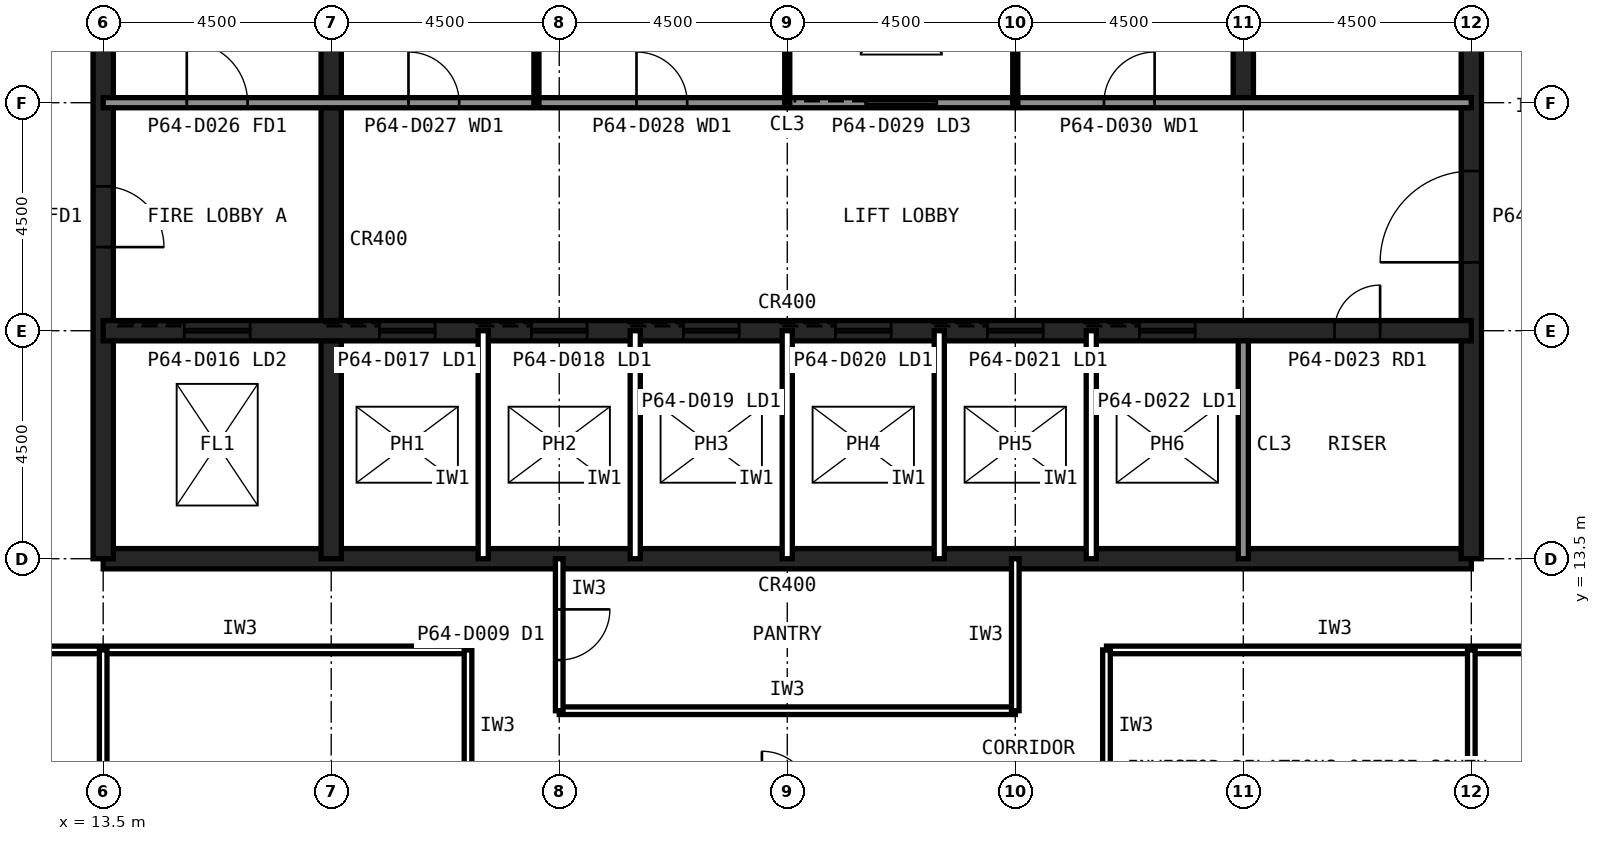
"""IFC4 building model, lengths in metres.
Left out: names, types, materials, properties, quantities, classifications, styles, units other than length and angle.
Written with IfcOpenShell. Run it as: python <this file> out.ifc"""

import sys

from ifc_helpers import new_model, si_unit, direction, frame, frame_2d, origin, place, context, subcontext, project, spatial, rectangle, extrude, element, fill, save


model = new_model("IFC4")
c1 = context("Model", 3, precision=1e-05, world=origin(), true_north=direction((0.0, 1.0)))
c2 = subcontext(c1, "Body", "Model", "MODEL_VIEW")
j1 = project(units=[si_unit("LENGTHUNIT", "METRE"), si_unit("PLANEANGLEUNIT", "RADIAN")], contexts=[c1])
p1 = place(None, origin())
s1 = spatial("IfcSite", under=j1, at=p1, CompositionType="ELEMENT")
p2 = place(p1, origin())
s2 = spatial("IfcBuilding", under=s1, at=p2, CompositionType="ELEMENT")
p3 = place(p2, frame((0.0, 0.0, 270.6)))
s3 = spatial("IfcBuildingStorey", under=s2, at=p3, CompositionType="ELEMENT", Elevation=270.6)
p4 = place(p3, frame((13.5, 13.5, 0.0), z_axis=(0.0, 0.0, 1.0), x_axis=(1.0, 0.0, 0.0)))
e1 = element("IfcWall", 1, at=p4, inside=s3, PredefinedType="SHEAR", context=c2, shape_type="SweptSolid", body=[
    extrude(rectangle(XDim=27.0, YDim=0.4, at=frame_2d((13.5, 0.0))), origin(), (0.0, 0.0, 1.0), 4.0),
])
p5 = place(p3, frame((40.5, 13.5, 0.0), z_axis=(0.0, 0.0, 1.0), x_axis=(0.0, 1.0, 0.0)))
e2 = element("IfcWall", 2, at=p5, inside=s3, PredefinedType="SHEAR", context=c2, shape_type="SweptSolid", body=[
    extrude(rectangle(XDim=27.0, YDim=0.4, at=frame_2d((13.5, 0.0))), origin(), (0.0, 0.0, 1.0), 4.0),
])
p6 = place(p5, frame((5.85, 0.0, 0.0)))
e3 = element("IfcOpeningElement", 3, at=p6, cuts=e2, PredefinedType="OPENING", context=c2, shape_type="SweptSolid", body=[
    extrude(rectangle(XDim=1.8, YDim=2.1, at=frame_2d((0.9, 1.05))), frame((0.0, 0.21, 0.0), z_axis=(0.0, -1.0, 0.0), x_axis=(1.0, 0.0, 0.0)), (0.0, 0.0, 1.0), 0.42),
])
p7 = place(p5, frame((19.65, 0.0, 0.0)))
e4 = element("IfcOpeningElement", 4, at=p7, cuts=e2, PredefinedType="OPENING", context=c2, shape_type="SweptSolid", body=[
    extrude(rectangle(XDim=1.2, YDim=2.1, at=frame_2d((0.6, 1.05))), frame((0.0, 0.21, 0.0), z_axis=(0.0, -1.0, 0.0), x_axis=(1.0, 0.0, 0.0)), (0.0, 0.0, 1.0), 0.42),
])
p8 = place(p3, frame((13.5, 40.5, 0.0), z_axis=(0.0, 0.0, 1.0), x_axis=(0.0, -1.0, 0.0)))
e5 = element("IfcWall", 5, at=p8, inside=s3, PredefinedType="SHEAR", context=c2, shape_type="SweptSolid", body=[
    extrude(rectangle(XDim=27.0, YDim=0.4, at=frame_2d((13.5, 0.0))), origin(), (0.0, 0.0, 1.0), 4.0),
])
p9 = place(p8, frame((19.65, 0.0, 0.0)))
e6 = element("IfcOpeningElement", 6, at=p9, cuts=e5, PredefinedType="OPENING", context=c2, shape_type="SweptSolid", body=[
    extrude(rectangle(XDim=1.2, YDim=2.1, at=frame_2d((0.6, 1.05))), frame((0.0, 0.21, 0.0), z_axis=(0.0, -1.0, 0.0), x_axis=(1.0, 0.0, 0.0)), (0.0, 0.0, 1.0), 0.42),
])
p10 = place(p8, frame((5.85, 0.0, 0.0)))
e7 = element("IfcOpeningElement", 7, at=p10, cuts=e5, PredefinedType="OPENING", context=c2, shape_type="SweptSolid", body=[
    extrude(rectangle(XDim=1.8, YDim=2.1, at=frame_2d((0.9, 1.05))), frame((0.0, 0.21, 0.0), z_axis=(0.0, -1.0, 0.0), x_axis=(1.0, 0.0, 0.0)), (0.0, 0.0, 1.0), 0.42),
])
p11 = place(p3, frame((18.0, 13.5, 0.0), z_axis=(0.0, 0.0, 1.0), x_axis=(0.0, 1.0, 0.0)))
e8 = element("IfcWall", 8, at=p11, inside=s3, PredefinedType="SHEAR", context=c2, shape_type="SweptSolid", body=[
    extrude(rectangle(XDim=18.0, YDim=0.4, at=frame_2d((9.0, 0.0))), origin(), (0.0, 0.0, 1.0), 4.0),
])
p12 = place(p3, frame((36.0, 13.5, 0.0), z_axis=(0.0, 0.0, 1.0), x_axis=(0.0, 1.0, 0.0)))
e9 = element("IfcWall", 9, at=p12, inside=s3, PredefinedType="SOLIDWALL", context=c2, shape_type="SweptSolid", body=[
    extrude(rectangle(XDim=4.5, YDim=0.2, at=frame_2d((2.25, 0.0))), origin(), (0.0, 0.0, 1.0), 3.84),
])
p13 = place(p3, frame((36.0, 22.5, 0.0), z_axis=(0.0, 0.0, 1.0), x_axis=(0.0, 1.0, 0.0)))
e10 = element("IfcWall", 10, at=p13, inside=s3, PredefinedType="SHEAR", context=c2, shape_type="SweptSolid", body=[
    extrude(rectangle(XDim=18.0, YDim=0.4, at=frame_2d((9.0, 0.0))), origin(), (0.0, 0.0, 1.0), 4.0),
])
p14 = place(p3, frame((13.5, 18.0, 0.0), z_axis=(0.0, 0.0, 1.0), x_axis=(1.0, 0.0, 0.0)))
e11 = element("IfcWall", 11, at=p14, inside=s3, PredefinedType="SHEAR", context=c2, shape_type="SweptSolid", body=[
    extrude(rectangle(XDim=27.0, YDim=0.4, at=frame_2d((13.5, 0.0))), origin(), (0.0, 0.0, 1.0), 4.0),
])
p15 = place(p14, frame((24.3, 0.0, 0.0)))
e12 = element("IfcOpeningElement", 12, at=p15, cuts=e11, PredefinedType="OPENING", context=c2, shape_type="SweptSolid", body=[
    extrude(rectangle(XDim=0.9, YDim=2.1, at=frame_2d((0.45, 1.05))), frame((0.0, 0.21, 0.0), z_axis=(0.0, -1.0, 0.0), x_axis=(1.0, 0.0, 0.0)), (0.0, 0.0, 1.0), 0.42),
])
p16 = place(p14, frame((5.45, 0.0, 0.0)))
e13 = element("IfcOpeningElement", 13, at=p16, cuts=e11, PredefinedType="OPENING", context=c2, shape_type="SweptSolid", body=[
    extrude(rectangle(XDim=1.1, YDim=2.1, at=frame_2d((0.55, 1.05))), frame((0.0, 0.21, 0.0), z_axis=(0.0, -1.0, 0.0), x_axis=(1.0, 0.0, 0.0)), (0.0, 0.0, 1.0), 0.42),
])
p17 = place(p14, frame((8.45, 0.0, 0.0)))
e14 = element("IfcOpeningElement", 14, at=p17, cuts=e11, PredefinedType="OPENING", context=c2, shape_type="SweptSolid", body=[
    extrude(rectangle(XDim=1.1, YDim=2.1, at=frame_2d((0.55, 1.05))), frame((0.0, 0.21, 0.0), z_axis=(0.0, -1.0, 0.0), x_axis=(1.0, 0.0, 0.0)), (0.0, 0.0, 1.0), 0.42),
])
p18 = place(p14, frame((11.45, 0.0, 0.0)))
e15 = element("IfcOpeningElement", 15, at=p18, cuts=e11, PredefinedType="OPENING", context=c2, shape_type="SweptSolid", body=[
    extrude(rectangle(XDim=1.1, YDim=2.1, at=frame_2d((0.55, 1.05))), frame((0.0, 0.21, 0.0), z_axis=(0.0, -1.0, 0.0), x_axis=(1.0, 0.0, 0.0)), (0.0, 0.0, 1.0), 0.42),
])
p19 = place(p14, frame((14.45, 0.0, 0.0)))
e16 = element("IfcOpeningElement", 16, at=p19, cuts=e11, PredefinedType="OPENING", context=c2, shape_type="SweptSolid", body=[
    extrude(rectangle(XDim=1.1, YDim=2.1, at=frame_2d((0.55, 1.05))), frame((0.0, 0.21, 0.0), z_axis=(0.0, -1.0, 0.0), x_axis=(1.0, 0.0, 0.0)), (0.0, 0.0, 1.0), 0.42),
])
p20 = place(p14, frame((17.45, 0.0, 0.0)))
e17 = element("IfcOpeningElement", 17, at=p20, cuts=e11, PredefinedType="OPENING", context=c2, shape_type="SweptSolid", body=[
    extrude(rectangle(XDim=1.1, YDim=2.1, at=frame_2d((0.55, 1.05))), frame((0.0, 0.21, 0.0), z_axis=(0.0, -1.0, 0.0), x_axis=(1.0, 0.0, 0.0)), (0.0, 0.0, 1.0), 0.42),
])
p21 = place(p14, frame((20.45, 0.0, 0.0)))
e18 = element("IfcOpeningElement", 18, at=p21, cuts=e11, PredefinedType="OPENING", context=c2, shape_type="SweptSolid", body=[
    extrude(rectangle(XDim=1.1, YDim=2.1, at=frame_2d((0.55, 1.05))), frame((0.0, 0.21, 0.0), z_axis=(0.0, -1.0, 0.0), x_axis=(1.0, 0.0, 0.0)), (0.0, 0.0, 1.0), 0.42),
])
p22 = place(p14, frame((1.6, 0.0, 0.0)))
e19 = element("IfcOpeningElement", 19, at=p22, cuts=e11, PredefinedType="OPENING", context=c2, shape_type="SweptSolid", body=[
    extrude(rectangle(XDim=1.3, YDim=2.2, at=frame_2d((0.65, 1.1))), frame((0.0, 0.21, 0.0), z_axis=(0.0, -1.0, 0.0), x_axis=(1.0, 0.0, 0.0)), (0.0, 0.0, 1.0), 0.42),
])
p23 = place(p3, frame((13.5, 22.5, 0.0), z_axis=(0.0, 0.0, 1.0), x_axis=(1.0, 0.0, 0.0)))
e20 = element("IfcWall", 20, at=p23, inside=s3, PredefinedType="SOLIDWALL", context=c2, shape_type="SweptSolid", body=[
    extrude(rectangle(XDim=27.0, YDim=0.2, at=frame_2d((13.5, 0.0))), origin(), (0.0, 0.0, 1.0), 3.84),
])
p24 = place(p23, frame((1.65, 0.0, 0.0)))
e21 = element("IfcOpeningElement", 21, at=p24, cuts=e20, PredefinedType="OPENING", context=c2, shape_type="SweptSolid", body=[
    extrude(rectangle(XDim=1.2, YDim=2.1, at=frame_2d((0.6, 1.05))), frame((0.0, 0.11, 0.0), z_axis=(0.0, -1.0, 0.0), x_axis=(1.0, 0.0, 0.0)), (0.0, 0.0, 1.0), 0.22),
])
p25 = place(p23, frame((6.025, 0.0, 0.0)))
e22 = element("IfcOpeningElement", 22, at=p25, cuts=e20, PredefinedType="OPENING", context=c2, shape_type="SweptSolid", body=[
    extrude(rectangle(XDim=1.0, YDim=2.1, at=frame_2d((0.5, 1.05))), frame((0.0, 0.11, 0.0), z_axis=(0.0, -1.0, 0.0), x_axis=(1.0, 0.0, 0.0)), (0.0, 0.0, 1.0), 0.22),
])
p26 = place(p23, frame((10.525, 0.0, 0.0)))
e23 = element("IfcOpeningElement", 23, at=p26, cuts=e20, PredefinedType="OPENING", context=c2, shape_type="SweptSolid", body=[
    extrude(rectangle(XDim=1.0, YDim=2.1, at=frame_2d((0.5, 1.05))), frame((0.0, 0.11, 0.0), z_axis=(0.0, -1.0, 0.0), x_axis=(1.0, 0.0, 0.0)), (0.0, 0.0, 1.0), 0.22),
])
p27 = place(p23, frame((19.75, 0.0, 0.0)))
e24 = element("IfcOpeningElement", 24, at=p27, cuts=e20, PredefinedType="OPENING", context=c2, shape_type="SweptSolid", body=[
    extrude(rectangle(XDim=1.0, YDim=2.1, at=frame_2d((0.5, 1.05))), frame((0.0, 0.11, 0.0), z_axis=(0.0, -1.0, 0.0), x_axis=(1.0, 0.0, 0.0)), (0.0, 0.0, 1.0), 0.22),
])
p28 = place(p23, frame((15.05, 0.0, 0.0)))
e25 = element("IfcOpeningElement", 25, at=p28, cuts=e20, PredefinedType="OPENING", context=c2, shape_type="SweptSolid", body=[
    extrude(rectangle(XDim=1.4, YDim=2.4, at=frame_2d((0.7, 1.2))), frame((0.0, 0.11, 0.0), z_axis=(0.0, -1.0, 0.0), x_axis=(1.0, 0.0, 0.0)), (0.0, 0.0, 1.0), 0.22),
])
for number, where, z_axis, x_axis in (
    (26, (21.0, 13.5, 0.0), (0.0, 0.0, 1.0), (0.0, 1.0, 0.0)),
    (27, (24.0, 13.5, 0.0), (0.0, 0.0, 1.0), (0.0, 1.0, 0.0)),
    (28, (27.0, 13.5, 0.0), (0.0, 0.0, 1.0), (0.0, 1.0, 0.0)),
    (29, (30.0, 13.5, 0.0), (0.0, 0.0, 1.0), (0.0, 1.0, 0.0)),
    (30, (33.0, 13.5, 0.0), (0.0, 0.0, 1.0), (0.0, 1.0, 0.0)),
):
    element("IfcWall", number, at=place(p3, frame(where, z_axis=z_axis, x_axis=x_axis)), inside=s3, PredefinedType="PARTITIONING", context=c2, shape_type="SweptSolid", body=[
        extrude(rectangle(XDim=4.5, YDim=0.2, at=frame_2d((2.25, 0.0))), origin(), (0.0, 0.0, 1.0), 3.84),
    ])
for number, where, z_axis, x_axis in (
    (31, (22.05, 22.5, 0.0), (0.0, 0.0, 1.0), (0.0, 1.0, 0.0)),
    (32, (27.0, 22.5, 0.0), (0.0, 0.0, 1.0), (0.0, 1.0, 0.0)),
    (33, (31.5, 22.5, 0.0), (0.0, 0.0, 1.0), (0.0, 1.0, 0.0)),
):
    element("IfcWall", number, at=place(p3, frame(where, z_axis=z_axis, x_axis=x_axis)), inside=s3, PredefinedType="PLUMBINGWALL", context=c2, shape_type="SweptSolid", body=[
        extrude(rectangle(XDim=9.0, YDim=0.1, at=frame_2d((4.5, 0.0))), origin(), (0.0, 0.0, 1.0), 3.84),
    ])
for number, where, z_axis, x_axis in (
    (34, (11.7, 11.7, 0.0), (0.0, 0.0, 1.0), (1.0, 0.0, 0.0)),
    (35, (33.3, 11.7, 0.0), (0.0, 0.0, 1.0), (1.0, 0.0, 0.0)),
):
    element("IfcWall", number, at=place(p3, frame(where, z_axis=z_axis, x_axis=x_axis)), inside=s3, PredefinedType="PARTITIONING", context=c2, shape_type="SweptSolid", body=[
        extrude(rectangle(XDim=9.0, YDim=0.15, at=frame_2d((4.5, 0.0))), origin(), (0.0, 0.0, 1.0), 3.84),
    ])
for number, where, z_axis, x_axis in (
    (36, (20.7, 11.7, 0.0), (0.0, 0.0, 1.0), (0.0, -1.0, 0.0)),
    (37, (33.3, 8.7, 0.0), (0.0, 0.0, 1.0), (0.0, 1.0, 0.0)),
):
    element("IfcWall", number, at=place(p3, frame(where, z_axis=z_axis, x_axis=x_axis)), inside=s3, PredefinedType="PARTITIONING", context=c2, shape_type="SweptSolid", body=[
        extrude(rectangle(XDim=3.0, YDim=0.15, at=frame_2d((1.5, 0.0))), origin(), (0.0, 0.0, 1.0), 3.84),
    ])
p29 = place(p3, frame((22.5, 10.5, 0.0), z_axis=(0.0, 0.0, 1.0), x_axis=(1.0, 0.0, 0.0)))
e38 = element("IfcWall", 38, at=p29, inside=s3, PredefinedType="PARTITIONING", context=c2, shape_type="SweptSolid", body=[
    extrude(rectangle(XDim=9.0, YDim=0.15, at=frame_2d((4.5, 0.0))), origin(), (0.0, 0.0, 1.0), 3.84),
])
p30 = place(p3, frame((31.5, 10.5, 0.0), z_axis=(0.0, 0.0, 1.0), x_axis=(0.0, 1.0, 0.0)))
e39 = element("IfcWall", 39, at=p30, inside=s3, PredefinedType="PARTITIONING", context=c2, shape_type="SweptSolid", body=[
    extrude(rectangle(XDim=3.0, YDim=0.15, at=frame_2d((1.5, 0.0))), origin(), (0.0, 0.0, 1.0), 2.989),
])
p31 = place(p3, frame((22.5, 13.5, 0.0), z_axis=(0.0, 0.0, 1.0), x_axis=(0.0, -1.0, 0.0)))
e40 = element("IfcWall", 40, at=p31, inside=s3, PredefinedType="PARTITIONING", context=c2, shape_type="SweptSolid", body=[
    extrude(rectangle(XDim=3.0, YDim=0.15, at=frame_2d((1.5, 0.0))), origin(), (0.0, 0.0, 1.0), 2.989),
])
p32 = place(p31, frame((1.0, 0.0, 0.0)))
e41 = element("IfcOpeningElement", 41, at=p32, cuts=e40, PredefinedType="OPENING", context=c2, shape_type="SweptSolid", body=[
    extrude(rectangle(XDim=1.0, YDim=2.1, at=frame_2d((0.5, 1.05))), frame((0.0, 0.085, 0.0), z_axis=(0.0, -1.0, 0.0), x_axis=(1.0, 0.0, 0.0)), (0.0, 0.0, 1.0), 0.17),
])
p33 = place(p3, frame((40.5, 4.82, 0.0), z_axis=(0.0, 0.0, 1.0), x_axis=(0.0, 1.0, 0.0)))
e42 = element("IfcWall", 42, at=p33, inside=s3, PredefinedType="PARTITIONING", context=c2, shape_type="SweptSolid", body=[
    extrude(rectangle(XDim=6.88, YDim=0.15, at=frame_2d((3.44, 0.0))), origin(), (0.0, 0.0, 1.0), 2.989),
])
p34 = place(p33, frame((2.94, 0.0, 0.0)))
e43 = element("IfcOpeningElement", 43, at=p34, cuts=e42, PredefinedType="OPENING", context=c2, shape_type="SweptSolid", body=[
    extrude(rectangle(XDim=1.0, YDim=2.1, at=frame_2d((0.5, 1.05))), frame((0.0, 0.085, 0.0), z_axis=(0.0, -1.0, 0.0), x_axis=(1.0, 0.0, 0.0)), (0.0, 0.0, 1.0), 0.17),
])
p35 = place(p3, frame((13.5, 11.7, 0.0), z_axis=(0.0, 0.0, 1.0), x_axis=(0.0, -1.0, 0.0)))
e44 = element("IfcWall", 44, at=p35, inside=s3, PredefinedType="PARTITIONING", context=c2, shape_type="SweptSolid", body=[
    extrude(rectangle(XDim=6.88, YDim=0.15, at=frame_2d((3.44, 0.0))), origin(), (0.0, 0.0, 1.0), 2.989),
])
p36 = place(p35, frame((2.94, 0.0, 0.0)))
e45 = element("IfcOpeningElement", 45, at=p36, cuts=e44, PredefinedType="OPENING", context=c2, shape_type="SweptSolid", body=[
    extrude(rectangle(XDim=1.0, YDim=2.1, at=frame_2d((0.5, 1.05))), frame((0.0, 0.085, 0.0), z_axis=(0.0, -1.0, 0.0), x_axis=(1.0, 0.0, 0.0)), (0.0, 0.0, 1.0), 0.17),
])
p37 = place(p9, origin())
e46 = element("IfcDoor", 46, at=p37, inside=s3, OperationType="SINGLE_SWING_RIGHT", PredefinedType="DOOR", context=c2, shape_type="SweptSolid", body=[
    extrude(rectangle(XDim=1.2, YDim=2.1, at=frame_2d((0.6, 1.05))), frame((0.0, 0.025, 0.0), z_axis=(0.0, -1.0, 0.0), x_axis=(1.0, 0.0, 0.0)), (0.0, 0.0, 1.0), 0.05),
])
fill(e6, e46)
p38 = place(p6, origin())
e47 = element("IfcDoor", 47, at=p38, inside=s3, OperationType="SINGLE_SWING_LEFT", PredefinedType="DOOR", context=c2, shape_type="SweptSolid", body=[
    extrude(rectangle(XDim=1.8, YDim=2.1, at=frame_2d((0.9, 1.05))), frame((0.0, 0.025, 0.0), z_axis=(0.0, -1.0, 0.0), x_axis=(1.0, 0.0, 0.0)), (0.0, 0.0, 1.0), 0.05),
])
fill(e3, e47)
p39 = place(p24, origin())
e48 = element("IfcDoor", 48, at=p39, inside=s3, OperationType="SINGLE_SWING_LEFT", PredefinedType="DOOR", context=c2, shape_type="SweptSolid", body=[
    extrude(rectangle(XDim=1.2, YDim=2.1, at=frame_2d((0.6, 1.05))), frame((0.0, 0.025, 0.0), z_axis=(0.0, -1.0, 0.0), x_axis=(1.0, 0.0, 0.0)), (0.0, 0.0, 1.0), 0.05),
])
fill(e21, e48)
p40 = place(p25, origin())
e49 = element("IfcDoor", 49, at=p40, inside=s3, OperationType="SINGLE_SWING_LEFT", PredefinedType="DOOR", context=c2, shape_type="SweptSolid", body=[
    extrude(rectangle(XDim=1.0, YDim=2.1, at=frame_2d((0.5, 1.05))), frame((0.0, 0.025, 0.0), z_axis=(0.0, -1.0, 0.0), x_axis=(1.0, 0.0, 0.0)), (0.0, 0.0, 1.0), 0.05),
])
fill(e22, e49)
p41 = place(p26, origin())
e50 = element("IfcDoor", 50, at=p41, inside=s3, OperationType="SINGLE_SWING_LEFT", PredefinedType="DOOR", context=c2, shape_type="SweptSolid", body=[
    extrude(rectangle(XDim=1.0, YDim=2.1, at=frame_2d((0.5, 1.05))), frame((0.0, 0.025, 0.0), z_axis=(0.0, -1.0, 0.0), x_axis=(1.0, 0.0, 0.0)), (0.0, 0.0, 1.0), 0.05),
])
fill(e23, e50)
p42 = place(p27, origin())
e51 = element("IfcDoor", 51, at=p42, inside=s3, OperationType="SINGLE_SWING_RIGHT", PredefinedType="DOOR", context=c2, shape_type="SweptSolid", body=[
    extrude(rectangle(XDim=1.0, YDim=2.1, at=frame_2d((0.5, 1.05))), frame((0.0, 0.025, 0.0), z_axis=(0.0, -1.0, 0.0), x_axis=(1.0, 0.0, 0.0)), (0.0, 0.0, 1.0), 0.05),
])
fill(e24, e51)
p43 = place(p15, origin())
e52 = element("IfcDoor", 52, at=p43, inside=s3, OperationType="SINGLE_SWING_RIGHT", PredefinedType="DOOR", context=c2, shape_type="SweptSolid", body=[
    extrude(rectangle(XDim=0.9, YDim=2.1, at=frame_2d((0.45, 1.05))), frame((0.0, 0.025, 0.0), z_axis=(0.0, -1.0, 0.0), x_axis=(1.0, 0.0, 0.0)), (0.0, 0.0, 1.0), 0.05),
])
fill(e12, e52)
p44 = place(p16, origin())
e53 = element("IfcDoor", 53, at=p44, inside=s3, OperationType="SLIDING_TO_LEFT", PredefinedType="DOOR", context=c2, shape_type="SweptSolid", body=[
    extrude(rectangle(XDim=1.1, YDim=2.1, at=frame_2d((0.55, 1.05))), frame((0.0, 0.025, 0.0), z_axis=(0.0, -1.0, 0.0), x_axis=(1.0, 0.0, 0.0)), (0.0, 0.0, 1.0), 0.05),
])
fill(e13, e53)
p45 = place(p17, origin())
e54 = element("IfcDoor", 54, at=p45, inside=s3, OperationType="SLIDING_TO_LEFT", PredefinedType="DOOR", context=c2, shape_type="SweptSolid", body=[
    extrude(rectangle(XDim=1.1, YDim=2.1, at=frame_2d((0.55, 1.05))), frame((0.0, 0.025, 0.0), z_axis=(0.0, -1.0, 0.0), x_axis=(1.0, 0.0, 0.0)), (0.0, 0.0, 1.0), 0.05),
])
fill(e14, e54)
p46 = place(p18, origin())
e55 = element("IfcDoor", 55, at=p46, inside=s3, OperationType="SLIDING_TO_LEFT", PredefinedType="DOOR", context=c2, shape_type="SweptSolid", body=[
    extrude(rectangle(XDim=1.1, YDim=2.1, at=frame_2d((0.55, 1.05))), frame((0.0, 0.025, 0.0), z_axis=(0.0, -1.0, 0.0), x_axis=(1.0, 0.0, 0.0)), (0.0, 0.0, 1.0), 0.05),
])
fill(e15, e55)
p47 = place(p19, origin())
e56 = element("IfcDoor", 56, at=p47, inside=s3, OperationType="SLIDING_TO_LEFT", PredefinedType="DOOR", context=c2, shape_type="SweptSolid", body=[
    extrude(rectangle(XDim=1.1, YDim=2.1, at=frame_2d((0.55, 1.05))), frame((0.0, 0.025, 0.0), z_axis=(0.0, -1.0, 0.0), x_axis=(1.0, 0.0, 0.0)), (0.0, 0.0, 1.0), 0.05),
])
fill(e16, e56)
p48 = place(p20, origin())
e57 = element("IfcDoor", 57, at=p48, inside=s3, OperationType="SLIDING_TO_LEFT", PredefinedType="DOOR", context=c2, shape_type="SweptSolid", body=[
    extrude(rectangle(XDim=1.1, YDim=2.1, at=frame_2d((0.55, 1.05))), frame((0.0, 0.025, 0.0), z_axis=(0.0, -1.0, 0.0), x_axis=(1.0, 0.0, 0.0)), (0.0, 0.0, 1.0), 0.05),
])
fill(e17, e57)
p49 = place(p21, origin())
e58 = element("IfcDoor", 58, at=p49, inside=s3, OperationType="SLIDING_TO_LEFT", PredefinedType="DOOR", context=c2, shape_type="SweptSolid", body=[
    extrude(rectangle(XDim=1.1, YDim=2.1, at=frame_2d((0.55, 1.05))), frame((0.0, 0.025, 0.0), z_axis=(0.0, -1.0, 0.0), x_axis=(1.0, 0.0, 0.0)), (0.0, 0.0, 1.0), 0.05),
])
fill(e18, e58)
p50 = place(p22, origin())
e59 = element("IfcDoor", 59, at=p50, inside=s3, OperationType="SLIDING_TO_LEFT", PredefinedType="DOOR", context=c2, shape_type="SweptSolid", body=[
    extrude(rectangle(XDim=1.3, YDim=2.2, at=frame_2d((0.65, 1.1))), frame((0.0, 0.025, 0.0), z_axis=(0.0, -1.0, 0.0), x_axis=(1.0, 0.0, 0.0)), (0.0, 0.0, 1.0), 0.05),
])
fill(e19, e59)
p51 = place(p28, origin())
e60 = element("IfcDoor", 60, at=p51, inside=s3, OperationType="SLIDING_TO_LEFT", PredefinedType="DOOR", context=c2, shape_type="SweptSolid", body=[
    extrude(rectangle(XDim=1.4, YDim=2.4, at=frame_2d((0.7, 1.2))), frame((0.0, 0.025, 0.0), z_axis=(0.0, -1.0, 0.0), x_axis=(1.0, 0.0, 0.0)), (0.0, 0.0, 1.0), 0.05),
])
fill(e25, e60)
p52 = place(p32, origin())
e61 = element("IfcDoor", 61, at=p52, inside=s3, OperationType="SINGLE_SWING_LEFT", PredefinedType="DOOR", context=c2, shape_type="SweptSolid", body=[
    extrude(rectangle(XDim=1.0, YDim=2.1, at=frame_2d((0.5, 1.05))), frame((0.0, 0.025, 0.0), z_axis=(0.0, -1.0, 0.0), x_axis=(1.0, 0.0, 0.0)), (0.0, 0.0, 1.0), 0.05),
])
fill(e41, e61)
save(model, sys.argv[1])
